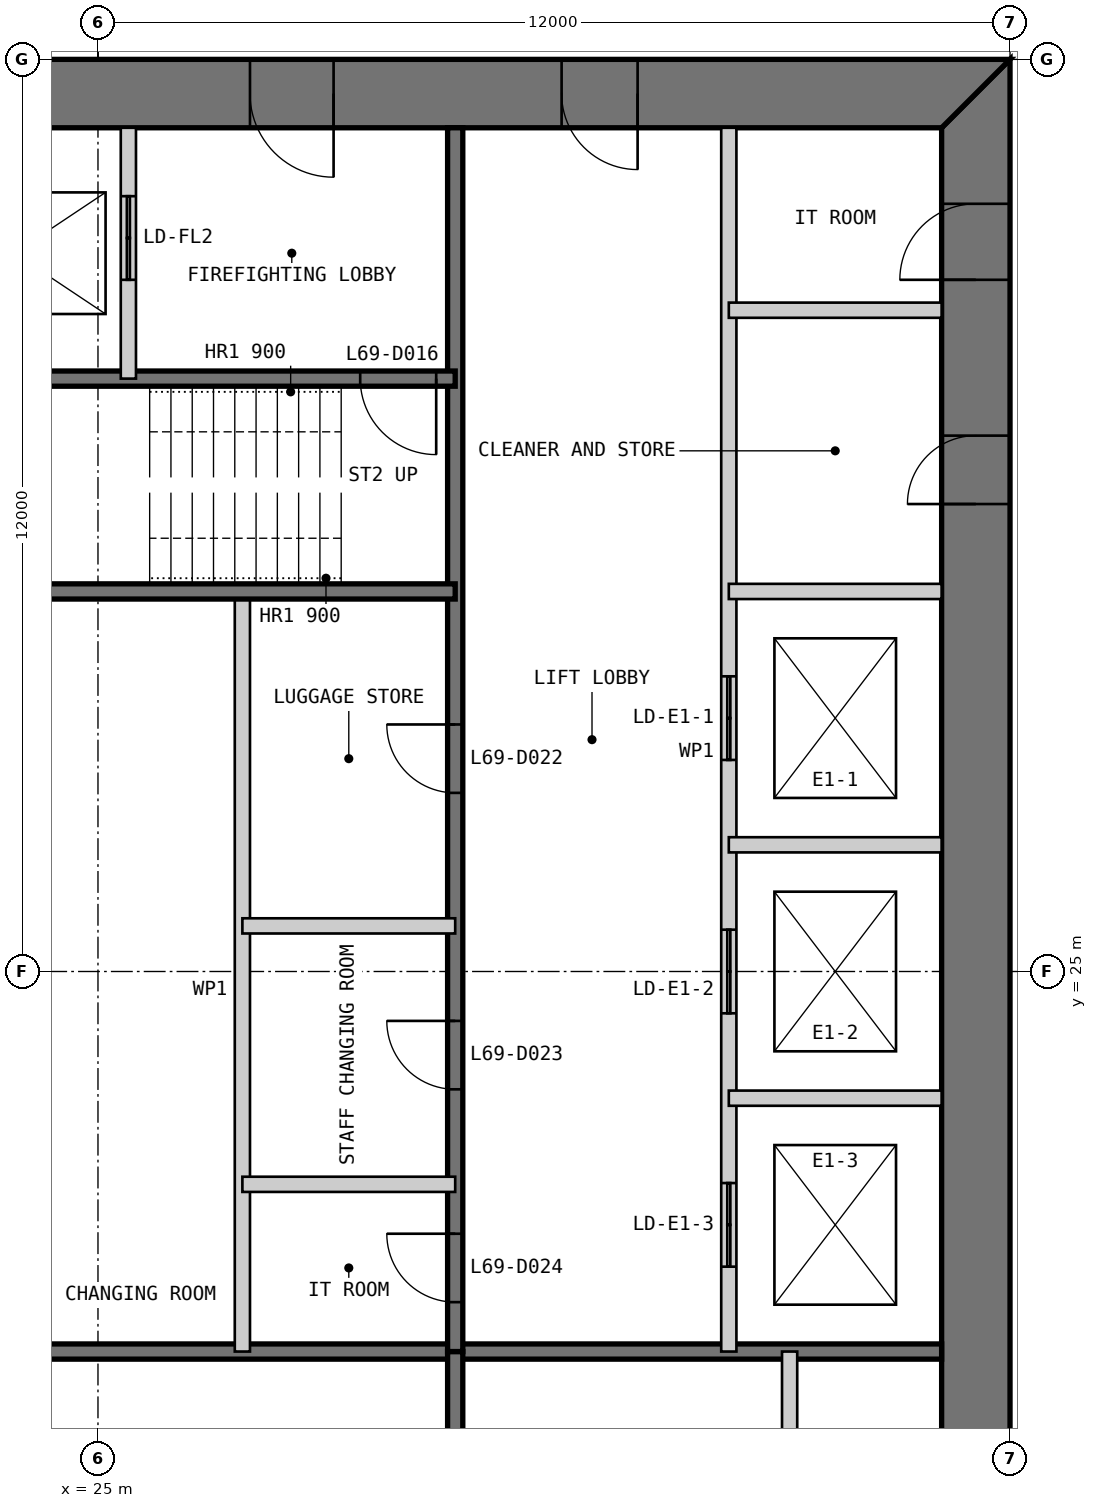
"""IFC4 building model, lengths in metres.
Left out: names, types, materials, properties, quantities, classifications, styles, units other than length and angle.
Written with IfcOpenShell. Run it as: python <this file> out.ifc"""

import sys

from ifc_helpers import new_model, si_unit, direction, frame, frame_2d, origin, place, context, subcontext, project, spatial, polyline, rectangle, outline, extrude, element, fill, save


model = new_model("IFC4")
c1 = context("Model", 3, precision=1e-05, world=origin(), true_north=direction((0.0, 1.0)))
c2 = subcontext(c1, "Body", "Model", "MODEL_VIEW")
j1 = project(units=[si_unit("LENGTHUNIT", "METRE"), si_unit("PLANEANGLEUNIT", "RADIAN")], contexts=[c1])
p1 = place(None, origin())
s1 = spatial("IfcSite", under=j1, at=p1, CompositionType="ELEMENT")
p2 = place(p1, origin())
s2 = spatial("IfcBuilding", under=s1, at=p2, CompositionType="ELEMENT")
p3 = place(p2, frame((0.0, 0.0, 286.6)))
s3 = spatial("IfcBuildingStorey", under=s2, at=p3, CompositionType="ELEMENT", Elevation=286.6)
p4 = place(p3, frame((36.55, 13.9, 0.0), z_axis=(0.0, 0.0, 1.0), x_axis=(0.0, 1.0, 0.0)))
e1 = element("IfcWall", 1, at=p4, inside=s3, PredefinedType="SHEAR", context=c2, shape_type="SweptSolid", body=[
    extrude(outline(polyline([(-0.9, -0.45), (23.1, -0.45), (22.2, 0.45), (0.0, 0.45), (-0.9, -0.45)])), origin(), (0.0, 0.0, 1.0), 3.4),
])
p5 = place(p4, frame((20.2, 0.0, 0.0)))
e2 = element("IfcOpeningElement", 2, at=p5, cuts=e1, PredefinedType="OPENING", context=c2, shape_type="SweptSolid", body=[
    extrude(rectangle(XDim=1.0, YDim=2.2, at=frame_2d((0.5, 1.1))), frame((0.0, 0.46, 0.0), z_axis=(0.0, -1.0, 0.0), x_axis=(1.0, 0.0, 0.0)), (0.0, 0.0, 1.0), 0.92),
])
p6 = place(p4, frame((17.25, 0.0, 0.0)))
e3 = element("IfcOpeningElement", 3, at=p6, cuts=e1, PredefinedType="OPENING", context=c2, shape_type="SweptSolid", body=[
    extrude(rectangle(XDim=0.9, YDim=2.2, at=frame_2d((0.45, 1.1))), frame((0.0, 0.46, 0.0), z_axis=(0.0, -1.0, 0.0), x_axis=(1.0, 0.0, 0.0)), (0.0, 0.0, 1.0), 0.92),
])
p7 = place(p3, frame((37.0, 36.55, 0.0), z_axis=(0.0, 0.0, 1.0), x_axis=(-1.0, 0.0, 0.0)))
e4 = element("IfcWall", 4, at=p7, inside=s3, PredefinedType="SHEAR", context=c2, shape_type="SweptSolid", body=[
    extrude(outline(polyline([(0.0, -0.45), (24.0, -0.45), (23.1, 0.45), (0.9, 0.45), (0.0, -0.45)])), origin(), (0.0, 0.0, 1.0), 3.4),
])
p8 = place(p7, frame((4.9, 0.0, 0.0)))
e5 = element("IfcOpeningElement", 5, at=p8, cuts=e4, PredefinedType="OPENING", context=c2, shape_type="SweptSolid", body=[
    extrude(rectangle(XDim=1.0, YDim=2.2, at=frame_2d((0.5, 1.1))), frame((0.0, 0.46, 0.0), z_axis=(0.0, -1.0, 0.0), x_axis=(1.0, 0.0, 0.0)), (0.0, 0.0, 1.0), 0.92),
])
p9 = place(p7, frame((8.9, 0.0, 0.0)))
e6 = element("IfcOpeningElement", 6, at=p9, cuts=e4, PredefinedType="OPENING", context=c2, shape_type="SweptSolid", body=[
    extrude(rectangle(XDim=1.1, YDim=2.2, at=frame_2d((0.55, 1.1))), frame((0.0, 0.46, 0.0), z_axis=(0.0, -1.0, 0.0), x_axis=(1.0, 0.0, 0.0)), (0.0, 0.0, 1.0), 0.92),
])
p10 = place(p7, frame((15.05, 0.0, 0.0)))
e7 = element("IfcOpeningElement", 7, at=p10, cuts=e4, PredefinedType="OPENING", context=c2, shape_type="SweptSolid", body=[
    extrude(rectangle(XDim=0.9, YDim=2.2, at=frame_2d((0.45, 1.1))), frame((0.0, 0.46, 0.0), z_axis=(0.0, -1.0, 0.0), x_axis=(1.0, 0.0, 0.0)), (0.0, 0.0, 1.0), 0.92),
])
p11 = place(p7, frame((17.9, 0.0, 0.0)))
e8 = element("IfcOpeningElement", 8, at=p11, cuts=e4, PredefinedType="OPENING", context=c2, shape_type="SweptSolid", body=[
    extrude(rectangle(XDim=1.0, YDim=2.2, at=frame_2d((0.5, 1.1))), frame((0.0, 0.46, 0.0), z_axis=(0.0, -1.0, 0.0), x_axis=(1.0, 0.0, 0.0)), (0.0, 0.0, 1.0), 0.92),
])
p12 = place(p7, frame((21.4, 0.0, 0.0)))
e9 = element("IfcOpeningElement", 9, at=p12, cuts=e4, PredefinedType="OPENING", context=c2, shape_type="SweptSolid", body=[
    extrude(rectangle(XDim=1.0, YDim=2.2, at=frame_2d((0.5, 1.1))), frame((0.0, 0.46, 0.0), z_axis=(0.0, -1.0, 0.0), x_axis=(1.0, 0.0, 0.0)), (0.0, 0.0, 1.0), 0.92),
])
p13 = place(p3, frame((20.3, 20.0, 0.0), z_axis=(0.0, 0.0, 1.0), x_axis=(1.0, 0.0, 0.0)))
e10 = element("IfcWall", 10, at=p13, inside=s3, PredefinedType="SOLIDWALL", context=c2, shape_type="SweptSolid", body=[
    extrude(rectangle(XDim=15.8, YDim=0.2, at=frame_2d((7.9, 0.0))), origin(), (0.0, 0.0, 1.0), 3.2),
])
p14 = place(p3, frame((29.7, 13.9, 0.0), z_axis=(0.0, 0.0, 1.0), x_axis=(0.0, 1.0, 0.0)))
e11 = element("IfcWall", 11, at=p14, inside=s3, PredefinedType="SOLIDWALL", context=c2, shape_type="SweptSolid", body=[
    extrude(rectangle(XDim=6.1, YDim=0.2, at=frame_2d((3.05, 0.0))), origin(), (0.0, 0.0, 1.0), 3.2),
])
p15 = place(p3, frame((34.1, 13.9, 0.0), z_axis=(0.0, 0.0, 1.0), x_axis=(0.0, 1.0, 0.0)))
e12 = element("IfcWall", 12, at=p15, inside=s3, PredefinedType="PARTITIONING", context=c2, shape_type="SweptSolid", body=[
    extrude(rectangle(XDim=6.1, YDim=0.2, at=frame_2d((3.05, 0.0))), origin(), (0.0, 0.0, 1.0), 3.2),
])
p16 = place(p3, frame((33.3, 36.1, 0.0), z_axis=(0.0, 0.0, 1.0), x_axis=(0.0, -1.0, 0.0)))
e13 = element("IfcWall", 13, at=p16, inside=s3, PredefinedType="PARTITIONING", context=c2, shape_type="SweptSolid", body=[
    extrude(rectangle(XDim=16.1, YDim=0.2, at=frame_2d((8.05, 0.0))), origin(), (0.0, 0.0, 1.0), 3.2),
])
p17 = place(p16, frame((7.217, 0.0, 0.0)))
e14 = element("IfcOpeningElement", 14, at=p17, cuts=e13, PredefinedType="OPENING", context=c2, shape_type="SweptSolid", body=[
    extrude(rectangle(XDim=1.1, YDim=2.2, at=frame_2d((0.55, 1.1))), frame((0.0, 0.11, 0.0), z_axis=(0.0, -1.0, 0.0), x_axis=(1.0, 0.0, 0.0)), (0.0, 0.0, 1.0), 0.22),
])
p18 = place(p16, frame((10.55, 0.0, 0.0)))
e15 = element("IfcOpeningElement", 15, at=p18, cuts=e13, PredefinedType="OPENING", context=c2, shape_type="SweptSolid", body=[
    extrude(rectangle(XDim=1.1, YDim=2.2, at=frame_2d((0.55, 1.1))), frame((0.0, 0.11, 0.0), z_axis=(0.0, -1.0, 0.0), x_axis=(1.0, 0.0, 0.0)), (0.0, 0.0, 1.0), 0.22),
])
p19 = place(p16, frame((13.883, 0.0, 0.0)))
e16 = element("IfcOpeningElement", 16, at=p19, cuts=e13, PredefinedType="OPENING", context=c2, shape_type="SweptSolid", body=[
    extrude(rectangle(XDim=1.1, YDim=2.2, at=frame_2d((0.55, 1.1))), frame((0.0, 0.11, 0.0), z_axis=(0.0, -1.0, 0.0), x_axis=(1.0, 0.0, 0.0)), (0.0, 0.0, 1.0), 0.22),
])
p20 = place(p3, frame((29.7, 36.1, 0.0), z_axis=(0.0, 0.0, 1.0), x_axis=(0.0, -1.0, 0.0)))
e17 = element("IfcWall", 17, at=p20, inside=s3, PredefinedType="SOLIDWALL", context=c2, shape_type="SweptSolid", body=[
    extrude(rectangle(XDim=16.1, YDim=0.2, at=frame_2d((8.05, 0.0))), origin(), (0.0, 0.0, 1.0), 3.2),
])
p21 = place(p20, frame((7.85, 0.0, 0.0)))
e18 = element("IfcOpeningElement", 18, at=p21, cuts=e17, PredefinedType="OPENING", context=c2, shape_type="SweptSolid", body=[
    extrude(rectangle(XDim=0.9, YDim=2.2, at=frame_2d((0.45, 1.1))), frame((0.0, 0.11, 0.0), z_axis=(0.0, -1.0, 0.0), x_axis=(1.0, 0.0, 0.0)), (0.0, 0.0, 1.0), 0.22),
])
p22 = place(p20, frame((11.75, 0.0, 0.0)))
e19 = element("IfcOpeningElement", 19, at=p22, cuts=e17, PredefinedType="OPENING", context=c2, shape_type="SweptSolid", body=[
    extrude(rectangle(XDim=0.9, YDim=2.2, at=frame_2d((0.45, 1.1))), frame((0.0, 0.11, 0.0), z_axis=(0.0, -1.0, 0.0), x_axis=(1.0, 0.0, 0.0)), (0.0, 0.0, 1.0), 0.22),
])
p23 = place(p20, frame((14.55, 0.0, 0.0)))
e20 = element("IfcOpeningElement", 20, at=p23, cuts=e17, PredefinedType="OPENING", context=c2, shape_type="SweptSolid", body=[
    extrude(rectangle(XDim=0.9, YDim=2.2, at=frame_2d((0.45, 1.1))), frame((0.0, 0.11, 0.0), z_axis=(0.0, -1.0, 0.0), x_axis=(1.0, 0.0, 0.0)), (0.0, 0.0, 1.0), 0.22),
])
for number, where, z_axis, x_axis in (
    (21, (36.1, 30.0, 0.0), (0.0, 0.0, 1.0), (-1.0, 0.0, 0.0)),
    (22, (36.1, 26.667, 0.0), (0.0, 0.0, 1.0), (-1.0, 0.0, 0.0)),
    (23, (36.1, 23.333, 0.0), (0.0, 0.0, 1.0), (-1.0, 0.0, 0.0)),
):
    element("IfcWall", number, at=place(p3, frame(where, z_axis=z_axis, x_axis=x_axis)), inside=s3, PredefinedType="PARTITIONING", context=c2, shape_type="SweptSolid", body=[
        extrude(rectangle(XDim=2.8, YDim=0.2, at=frame_2d((1.4, 0.0))), origin(), (0.0, 0.0, 1.0), 3.2),
    ])
p24 = place(p3, frame((26.9, 30.0, 0.0), z_axis=(0.0, 0.0, 1.0), x_axis=(0.0, -1.0, 0.0)))
e24 = element("IfcWall", 24, at=p24, inside=s3, PredefinedType="PARTITIONING", context=c2, shape_type="SweptSolid", body=[
    extrude(rectangle(XDim=10.0, YDim=0.2, at=frame_2d((5.0, 0.0))), origin(), (0.0, 0.0, 1.0), 3.2),
])
p25 = place(p3, frame((29.7, 32.8, 0.0), z_axis=(0.0, 0.0, 1.0), x_axis=(-1.0, 0.0, 0.0)))
e25 = element("IfcWall", 25, at=p25, inside=s3, PredefinedType="SOLIDWALL", context=c2, shape_type="SweptSolid", body=[
    extrude(rectangle(XDim=9.4, YDim=0.2, at=frame_2d((4.7, 0.0))), origin(), (0.0, 0.0, 1.0), 3.2),
])
p26 = place(p25, frame((0.25, 0.0, 0.0)))
e26 = element("IfcOpeningElement", 26, at=p26, cuts=e25, PredefinedType="OPENING", context=c2, shape_type="SweptSolid", body=[
    extrude(rectangle(XDim=1.0, YDim=2.2, at=frame_2d((0.5, 1.1))), frame((0.0, 0.11, 0.0), z_axis=(0.0, -1.0, 0.0), x_axis=(1.0, 0.0, 0.0)), (0.0, 0.0, 1.0), 0.22),
])
p27 = place(p3, frame((29.7, 30.0, 0.0), z_axis=(0.0, 0.0, 1.0), x_axis=(-1.0, 0.0, 0.0)))
e27 = element("IfcWall", 27, at=p27, inside=s3, PredefinedType="SOLIDWALL", context=c2, shape_type="SweptSolid", body=[
    extrude(rectangle(XDim=15.8, YDim=0.2, at=frame_2d((7.9, 0.0))), origin(), (0.0, 0.0, 1.0), 3.2),
])
p28 = place(p3, frame((25.4, 36.1, 0.0), z_axis=(0.0, 0.0, 1.0), x_axis=(0.0, -1.0, 0.0)))
e28 = element("IfcWall", 28, at=p28, inside=s3, PredefinedType="PARTITIONING", context=c2, shape_type="SweptSolid", body=[
    extrude(rectangle(XDim=3.3, YDim=0.2, at=frame_2d((1.65, 0.0))), origin(), (0.0, 0.0, 1.0), 3.2),
])
p29 = place(p28, frame((0.9, 0.0, 0.0)))
e29 = element("IfcOpeningElement", 29, at=p29, cuts=e28, PredefinedType="OPENING", context=c2, shape_type="SweptSolid", body=[
    extrude(rectangle(XDim=1.1, YDim=2.2, at=frame_2d((0.55, 1.1))), frame((0.0, 0.11, 0.0), z_axis=(0.0, -1.0, 0.0), x_axis=(1.0, 0.0, 0.0)), (0.0, 0.0, 1.0), 0.22),
])
for number, where, z_axis, x_axis in (
    (30, (36.1, 33.7, 0.0), (0.0, 0.0, 1.0), (-1.0, 0.0, 0.0)),
    (31, (29.7, 25.6, 0.0), (0.0, 0.0, 1.0), (-1.0, 0.0, 0.0)),
    (32, (29.7, 22.2, 0.0), (0.0, 0.0, 1.0), (-1.0, 0.0, 0.0)),
):
    element("IfcWall", number, at=place(p3, frame(where, z_axis=z_axis, x_axis=x_axis)), inside=s3, PredefinedType="PARTITIONING", context=c2, shape_type="SweptSolid", body=[
        extrude(rectangle(XDim=2.8, YDim=0.2, at=frame_2d((1.4, 0.0))), origin(), (0.0, 0.0, 1.0), 3.2),
    ])
p30 = place(p8, origin())
e33 = element("IfcDoor", 33, at=p30, inside=s3, OperationType="SINGLE_SWING_LEFT", PredefinedType="DOOR", context=c2, shape_type="SweptSolid", body=[
    extrude(rectangle(XDim=1.0, YDim=2.2, at=frame_2d((0.5, 1.1))), frame((0.0, 0.025, 0.0), z_axis=(0.0, -1.0, 0.0), x_axis=(1.0, 0.0, 0.0)), (0.0, 0.0, 1.0), 0.05),
    extrude(outline(polyline([(0.0, 0.0), (0.04, 0.0), (0.04, 2.16), (0.96, 2.16), (0.96, 0.0), (1.0, 0.0), (1.0, 2.2), (0.0, 2.2), (0.0, 0.0)])), frame((0.0, 0.3, 0.0), z_axis=(0.0, -1.0, 0.0), x_axis=(1.0, 0.0, 0.0)), (0.0, 0.0, 1.0), 0.6),
])
fill(e5, e33)
p31 = place(p9, origin())
e34 = element("IfcDoor", 34, at=p31, inside=s3, OperationType="SINGLE_SWING_LEFT", PredefinedType="DOOR", context=c2, shape_type="SweptSolid", body=[
    extrude(rectangle(XDim=1.1, YDim=2.2, at=frame_2d((0.55, 1.1))), frame((0.0, 0.025, 0.0), z_axis=(0.0, -1.0, 0.0), x_axis=(1.0, 0.0, 0.0)), (0.0, 0.0, 1.0), 0.05),
    extrude(outline(polyline([(0.0, 0.0), (0.04, 0.0), (0.04, 2.16), (1.06, 2.16), (1.06, 0.0), (1.1, 0.0), (1.1, 2.2), (0.0, 2.2), (0.0, 0.0)])), frame((0.0, 0.3, 0.0), z_axis=(0.0, -1.0, 0.0), x_axis=(1.0, 0.0, 0.0)), (0.0, 0.0, 1.0), 0.6),
])
fill(e6, e34)
p32 = place(p26, origin())
e35 = element("IfcDoor", 35, at=p32, inside=s3, OperationType="SINGLE_SWING_LEFT", PredefinedType="DOOR", context=c2, shape_type="SweptSolid", body=[
    extrude(rectangle(XDim=1.0, YDim=2.2, at=frame_2d((0.5, 1.1))), frame((0.0, 0.025, 0.0), z_axis=(0.0, -1.0, 0.0), x_axis=(1.0, 0.0, 0.0)), (0.0, 0.0, 1.0), 0.05),
])
fill(e26, e35)
p33 = place(p5, origin())
e36 = element("IfcDoor", 36, at=p33, inside=s3, OperationType="SINGLE_SWING_LEFT", PredefinedType="DOOR", context=c2, shape_type="SweptSolid", body=[
    extrude(rectangle(XDim=1.0, YDim=2.2, at=frame_2d((0.5, 1.1))), frame((0.0, 0.025, 0.0), z_axis=(0.0, -1.0, 0.0), x_axis=(1.0, 0.0, 0.0)), (0.0, 0.0, 1.0), 0.05),
    extrude(outline(polyline([(0.0, 0.0), (0.04, 0.0), (0.04, 2.16), (0.96, 2.16), (0.96, 0.0), (1.0, 0.0), (1.0, 2.2), (0.0, 2.2), (0.0, 0.0)])), frame((0.0, 0.3, 0.0), z_axis=(0.0, -1.0, 0.0), x_axis=(1.0, 0.0, 0.0)), (0.0, 0.0, 1.0), 0.6),
])
fill(e2, e36)
p34 = place(p6, origin())
e37 = element("IfcDoor", 37, at=p34, inside=s3, OperationType="SINGLE_SWING_LEFT", PredefinedType="DOOR", context=c2, shape_type="SweptSolid", body=[
    extrude(rectangle(XDim=0.9, YDim=2.2, at=frame_2d((0.45, 1.1))), frame((0.0, 0.025, 0.0), z_axis=(0.0, -1.0, 0.0), x_axis=(1.0, 0.0, 0.0)), (0.0, 0.0, 1.0), 0.05),
    extrude(outline(polyline([(0.0, 0.0), (0.04, 0.0), (0.04, 2.16), (0.86, 2.16), (0.86, 0.0), (0.9, 0.0), (0.9, 2.2), (0.0, 2.2), (0.0, 0.0)])), frame((0.0, 0.3, 0.0), z_axis=(0.0, -1.0, 0.0), x_axis=(1.0, 0.0, 0.0)), (0.0, 0.0, 1.0), 0.6),
])
fill(e3, e37)
p35 = place(p21, frame((0.9, 0.0, 0.0), z_axis=(0.0, 0.0, 1.0), x_axis=(-1.0, 0.0, 0.0)))
e38 = element("IfcDoor", 38, at=p35, inside=s3, OperationType="SINGLE_SWING_RIGHT", PredefinedType="DOOR", context=c2, shape_type="SweptSolid", body=[
    extrude(rectangle(XDim=0.9, YDim=2.2, at=frame_2d((0.45, 1.1))), frame((0.0, 0.025, 0.0), z_axis=(0.0, -1.0, 0.0), x_axis=(1.0, 0.0, 0.0)), (0.0, 0.0, 1.0), 0.05),
])
fill(e18, e38)
p36 = place(p22, frame((0.9, 0.0, 0.0), z_axis=(0.0, 0.0, 1.0), x_axis=(-1.0, 0.0, 0.0)))
e39 = element("IfcDoor", 39, at=p36, inside=s3, OperationType="SINGLE_SWING_RIGHT", PredefinedType="DOOR", context=c2, shape_type="SweptSolid", body=[
    extrude(rectangle(XDim=0.9, YDim=2.2, at=frame_2d((0.45, 1.1))), frame((0.0, 0.025, 0.0), z_axis=(0.0, -1.0, 0.0), x_axis=(1.0, 0.0, 0.0)), (0.0, 0.0, 1.0), 0.05),
])
fill(e19, e39)
p37 = place(p23, frame((0.9, 0.0, 0.0), z_axis=(0.0, 0.0, 1.0), x_axis=(-1.0, 0.0, 0.0)))
e40 = element("IfcDoor", 40, at=p37, inside=s3, OperationType="SINGLE_SWING_RIGHT", PredefinedType="DOOR", context=c2, shape_type="SweptSolid", body=[
    extrude(rectangle(XDim=0.9, YDim=2.2, at=frame_2d((0.45, 1.1))), frame((0.0, 0.025, 0.0), z_axis=(0.0, -1.0, 0.0), x_axis=(1.0, 0.0, 0.0)), (0.0, 0.0, 1.0), 0.05),
])
fill(e20, e40)
p38 = place(p29, origin())
e41 = element("IfcDoor", 41, at=p38, inside=s3, OperationType="DOUBLE_DOOR_SLIDING", PredefinedType="DOOR", context=c2, shape_type="SweptSolid", body=[
    extrude(rectangle(XDim=1.1, YDim=2.2, at=frame_2d((0.55, 1.1))), frame((0.0, 0.025, 0.0), z_axis=(0.0, -1.0, 0.0), x_axis=(1.0, 0.0, 0.0)), (0.0, 0.0, 1.0), 0.05),
])
fill(e29, e41)
p39 = place(p17, origin())
e42 = element("IfcDoor", 42, at=p39, inside=s3, OperationType="DOUBLE_DOOR_SLIDING", PredefinedType="DOOR", context=c2, shape_type="SweptSolid", body=[
    extrude(rectangle(XDim=1.1, YDim=2.2, at=frame_2d((0.55, 1.1))), frame((0.0, 0.025, 0.0), z_axis=(0.0, -1.0, 0.0), x_axis=(1.0, 0.0, 0.0)), (0.0, 0.0, 1.0), 0.05),
])
fill(e14, e42)
p40 = place(p18, origin())
e43 = element("IfcDoor", 43, at=p40, inside=s3, OperationType="DOUBLE_DOOR_SLIDING", PredefinedType="DOOR", context=c2, shape_type="SweptSolid", body=[
    extrude(rectangle(XDim=1.1, YDim=2.2, at=frame_2d((0.55, 1.1))), frame((0.0, 0.025, 0.0), z_axis=(0.0, -1.0, 0.0), x_axis=(1.0, 0.0, 0.0)), (0.0, 0.0, 1.0), 0.05),
])
fill(e15, e43)
p41 = place(p19, origin())
e44 = element("IfcDoor", 44, at=p41, inside=s3, OperationType="DOUBLE_DOOR_SLIDING", PredefinedType="DOOR", context=c2, shape_type="SweptSolid", body=[
    extrude(rectangle(XDim=1.1, YDim=2.2, at=frame_2d((0.55, 1.1))), frame((0.0, 0.025, 0.0), z_axis=(0.0, -1.0, 0.0), x_axis=(1.0, 0.0, 0.0)), (0.0, 0.0, 1.0), 0.05),
])
fill(e16, e44)
save(model, sys.argv[1])
